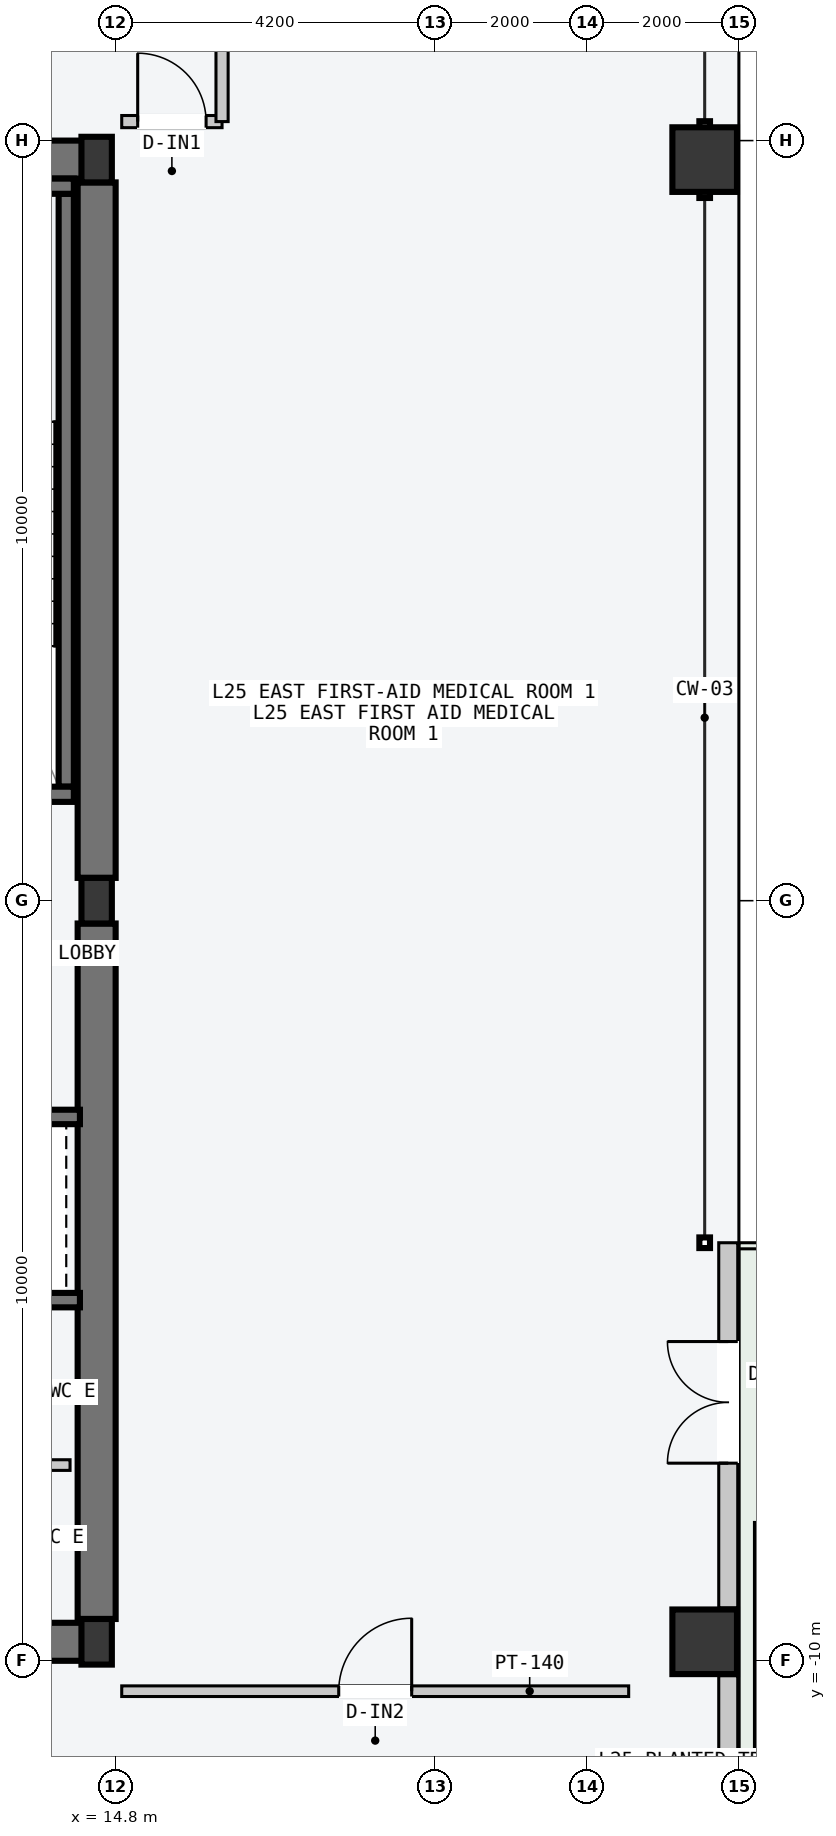
"""IFC4 building model, lengths in metres.
Left out: names, types, materials, properties, quantities, classifications, styles, units other than length and angle.
Written with IfcOpenShell. Run it as: python <this file> out.ifc"""

import sys

from ifc_helpers import new_model, si_unit, direction, frame, frame_2d, origin, origin_2d, place, context, subcontext, project, spatial, rectangle, hollow_rectangle, i_section, extrude, element, fill, save


model = new_model("IFC4")
c1 = context("Model", 3, precision=1e-05, world=origin(), true_north=direction((0.0, 1.0)))
c2 = subcontext(c1, "Body", "Model", "MODEL_VIEW")
j1 = project(units=[si_unit("LENGTHUNIT", "METRE"), si_unit("PLANEANGLEUNIT", "RADIAN")], contexts=[c1])
p1 = place(None, origin())
s1 = spatial("IfcSite", under=j1, at=p1, CompositionType="ELEMENT")
p2 = place(p1, origin())
s2 = spatial("IfcBuilding", under=s1, at=p2, CompositionType="ELEMENT")
p3 = place(p2, frame((0.0, 0.0, 99.0)))
s3 = spatial("IfcBuildingStorey", under=s2, at=p3, CompositionType="ELEMENT", Elevation=99.0)
for number, where, z_axis, x_axis in (
    (1, (8.07, -9.75, -0.2), (0.0, 0.0, 1.0), (1.0, 0.0, 0.0)),
    (2, (8.07, 9.75, -0.2), (0.0, 0.0, 1.0), (1.0, 0.0, 0.0)),
):
    element("IfcWall", number, at=place(p3, frame(where, z_axis=z_axis, x_axis=x_axis)), inside=s3, PredefinedType="SHEAR", context=c2, shape_type="SweptSolid", body=[
        extrude(rectangle(XDim=6.46, YDim=0.5, at=frame_2d((3.23, 0.0))), origin(), (0.0, 0.0, 1.0), 3.6),
    ])
for number, where, z_axis, x_axis in (
    (3, (14.55, -9.45, -0.2), (0.0, 0.0, 1.0), (0.0, 1.0, 0.0)),
    (4, (14.55, 0.3, -0.2), (0.0, 0.0, 1.0), (0.0, 1.0, 0.0)),
):
    element("IfcWall", number, at=place(p3, frame(where, z_axis=z_axis, x_axis=x_axis)), inside=s3, PredefinedType="SHEAR", context=c2, shape_type="SweptSolid", body=[
        extrude(rectangle(XDim=9.15, YDim=0.5, at=frame_2d((4.575, 0.0))), origin(), (0.0, 0.0, 1.0), 3.6),
    ])
p4 = place(p3, frame((14.15, 1.5, -0.2), z_axis=(0.0, 0.0, 1.0), x_axis=(0.0, 1.0, 0.0)))
e5 = element("IfcWall", 5, at=p4, inside=s3, PredefinedType="SOLIDWALL", context=c2, shape_type="SweptSolid", body=[
    extrude(rectangle(XDim=7.8, YDim=0.2, at=frame_2d((3.9, 0.0))), origin(), (0.0, 0.0, 1.0), 3.6),
])
p5 = place(p3, frame((10.15, 1.4, -0.2), z_axis=(0.0, 0.0, 1.0), x_axis=(1.0, 0.0, 0.0)))
e6 = element("IfcWall", 6, at=p5, inside=s3, PredefinedType="SOLIDWALL", context=c2, shape_type="SweptSolid", body=[
    extrude(rectangle(XDim=4.1, YDim=0.2, at=frame_2d((2.05, 0.0))), origin(), (0.0, 0.0, 1.0), 3.6),
])
p6 = place(p5, frame((1.5, 0.0, 0.2)))
e7 = element("IfcOpeningElement", 7, at=p6, cuts=e6, PredefinedType="OPENING", context=c2, shape_type="SweptSolid", body=[
    extrude(rectangle(XDim=1.12, YDim=2.18, at=frame_2d((0.56, 1.09))), frame((0.0, 0.11, 0.0), z_axis=(0.0, -1.0, 0.0), x_axis=(1.0, 0.0, 0.0)), (0.0, 0.0, 1.0), 0.22),
])
p7 = place(p3, frame((10.15, 9.4, -0.2), z_axis=(0.0, 0.0, 1.0), x_axis=(1.0, 0.0, 0.0)))
e8 = element("IfcWall", 8, at=p7, inside=s3, PredefinedType="SOLIDWALL", context=c2, shape_type="SweptSolid", body=[
    extrude(rectangle(XDim=4.1, YDim=0.2, at=frame_2d((2.05, 0.0))), origin(), (0.0, 0.0, 1.0), 3.6),
])
for number, where, z_axis, x_axis in (
    (9, (14.55, -9.75, 0.0), (0.0, 0.0, 1.0), (1.0, 0.0, 0.0)),
    (10, (14.55, 0.0, 0.0), (0.0, 0.0, 1.0), (1.0, 0.0, 0.0)),
    (11, (14.55, 9.75, 0.0), (0.0, 0.0, 1.0), (1.0, 0.0, 0.0)),
):
    element("IfcColumn", number, at=place(p3, frame(where, z_axis=z_axis, x_axis=x_axis)), inside=s3, PredefinedType="COLUMN", context=c2, shape_type="SweptSolid", body=[
        extrude(i_section(OverallWidth=0.4, OverallDepth=0.6, WebThickness=0.022, FlangeThickness=0.036, at=origin_2d()), origin(), (0.0, 0.0, 1.0), 3.6),
    ])
for number, where, z_axis, x_axis in (
    (12, (22.55, -9.75, 0.0), (0.0, 0.0, 1.0), (0.0, 1.0, 0.0)),
    (13, (22.55, 9.75, 0.0), (0.0, 0.0, 1.0), (0.0, 1.0, 0.0)),
):
    element("IfcColumn", number, at=place(p3, frame(where, z_axis=z_axis, x_axis=x_axis)), inside=s3, PredefinedType="COLUMN", context=c2, shape_type="SweptSolid", body=[
        extrude(hollow_rectangle(XDim=0.85, YDim=0.85, WallThickness=0.04, at=origin_2d()), origin(), (0.0, 0.0, 1.0), 3.6),
    ])
p8 = place(p3, frame((22.86, -14.605, 0.0), z_axis=(0.0, 0.0, 1.0), x_axis=(0.0, 1.0, 0.0)))
e14 = element("IfcWall", 14, at=p8, inside=s3, PredefinedType="STANDARD", context=c2, shape_type="SweptSolid", body=[
    extrude(rectangle(XDim=4.41, YDim=0.25, at=frame_2d((2.205, 0.0))), origin(), (0.0, 0.0, 1.0), 3.4),
])
p9 = place(p8, frame((1.405, 0.0, 0.85)))
e15 = element("IfcOpeningElement", 15, at=p9, cuts=e14, PredefinedType="OPENING", context=c2, shape_type="SweptSolid", body=[
    extrude(rectangle(XDim=2.0, YDim=2.1, at=frame_2d((1.0, 1.05))), frame((0.0, 0.135, 0.0), z_axis=(0.0, -1.0, 0.0), x_axis=(1.0, 0.0, 0.0)), (0.0, 0.0, 1.0), 0.27),
])
p10 = place(p3, frame((22.86, -9.305, 0.0), z_axis=(0.0, 0.0, 1.0), x_axis=(0.0, 1.0, 0.0)))
e16 = element("IfcWall", 16, at=p10, inside=s3, PredefinedType="STANDARD", context=c2, shape_type="SweptSolid", body=[
    extrude(rectangle(XDim=4.805, YDim=0.25, at=frame_2d((2.402, 0.0))), origin(), (0.0, 0.0, 1.0), 3.4),
])
p11 = place(p10, frame((1.905, 0.0, 0.0)))
e17 = element("IfcOpeningElement", 17, at=p11, cuts=e16, PredefinedType="OPENING", context=c2, shape_type="SweptSolid", body=[
    extrude(rectangle(XDim=1.6, YDim=2.2, at=frame_2d((0.8, 1.1))), frame((0.0, 0.135, 0.0), z_axis=(0.0, -1.0, 0.0), x_axis=(1.0, 0.0, 0.0)), (0.0, 0.0, 1.0), 0.27),
])
p12 = place(p3, frame((11.65, -2.845, -0.2), z_axis=(0.0, 0.0, 1.0), x_axis=(1.0, 0.0, 0.0)))
e18 = element("IfcWall", 18, at=p12, inside=s3, PredefinedType="SOLIDWALL", context=c2, shape_type="SweptSolid", body=[
    extrude(rectangle(XDim=2.68, YDim=0.19, at=frame_2d((1.34, 0.0))), origin(), (0.0, 0.0, 1.0), 3.6),
])
p13 = place(p12, frame((0.65, 0.0, 0.2)))
e19 = element("IfcOpeningElement", 19, at=p13, cuts=e18, PredefinedType="OPENING", context=c2, shape_type="SweptSolid", body=[
    extrude(rectangle(XDim=1.2, YDim=2.2, at=frame_2d((0.6, 1.1))), frame((0.0, 0.105, 0.0), z_axis=(0.0, -1.0, 0.0), x_axis=(1.0, 0.0, 0.0)), (0.0, 0.0, 1.0), 0.21),
])
p14 = place(p3, frame((11.65, -5.255, -0.2), z_axis=(0.0, 0.0, 1.0), x_axis=(1.0, 0.0, 0.0)))
e20 = element("IfcWall", 20, at=p14, inside=s3, PredefinedType="SOLIDWALL", context=c2, shape_type="SweptSolid", body=[
    extrude(rectangle(XDim=2.68, YDim=0.19, at=frame_2d((1.34, 0.0))), origin(), (0.0, 0.0, 1.0), 3.6),
])
p15 = place(p3, frame((11.7, -7.425, 0.0), z_axis=(0.0, 0.0, 1.0), x_axis=(1.0, 0.0, 0.0)))
e21 = element("IfcWall", 21, at=p15, inside=s3, PredefinedType="PARTITIONING", context=c2, shape_type="SweptSolid", body=[
    extrude(rectangle(XDim=2.5, YDim=0.14, at=frame_2d((1.25, 0.0))), origin(), (0.0, 0.0, 1.0), 3.4),
])
p16 = place(p3, frame((14.88, -10.4, 0.0), z_axis=(0.0, 0.0, 1.0), x_axis=(1.0, 0.0, 0.0)))
e22 = element("IfcWall", 22, at=p16, inside=s3, PredefinedType="PARTITIONING", context=c2, shape_type="SweptSolid", body=[
    extrude(rectangle(XDim=6.67, YDim=0.14, at=frame_2d((3.335, 0.0))), origin(), (0.0, 0.0, 1.0), 3.4),
])
p17 = place(p16, frame((2.855, 0.0, 0.0)))
e23 = element("IfcOpeningElement", 23, at=p17, cuts=e22, PredefinedType="OPENING", context=c2, shape_type="SweptSolid", body=[
    extrude(rectangle(XDim=0.96, YDim=2.18, at=frame_2d((0.48, 1.09))), frame((0.0, 0.08, 0.0), z_axis=(0.0, -1.0, 0.0), x_axis=(1.0, 0.0, 0.0)), (0.0, 0.0, 1.0), 0.16),
])
p18 = place(p3, frame((14.88, 10.25, 0.0), z_axis=(0.0, 0.0, 1.0), x_axis=(1.0, 0.0, 0.0)))
e24 = element("IfcWall", 24, at=p18, inside=s3, PredefinedType="PARTITIONING", context=c2, shape_type="SweptSolid", body=[
    extrude(rectangle(XDim=1.32, YDim=0.16, at=frame_2d((0.66, 0.0))), origin(), (0.0, 0.0, 1.0), 3.4),
])
p19 = place(p18, frame((0.21, 0.0, 0.0)))
e25 = element("IfcOpeningElement", 25, at=p19, cuts=e24, PredefinedType="OPENING", context=c2, shape_type="SweptSolid", body=[
    extrude(rectangle(XDim=0.9, YDim=2.15, at=frame_2d((0.45, 1.075))), frame((0.0, 0.09, 0.0), z_axis=(0.0, -1.0, 0.0), x_axis=(1.0, 0.0, 0.0)), (0.0, 0.0, 1.0), 0.18),
])
p20 = place(p3, frame((16.2, 10.25, 0.0), z_axis=(0.0, 0.0, 1.0), x_axis=(0.0, 1.0, 0.0)))
e26 = element("IfcWall", 26, at=p20, inside=s3, PredefinedType="PARTITIONING", context=c2, shape_type="SweptSolid", body=[
    extrude(rectangle(XDim=1.95, YDim=0.16, at=frame_2d((0.975, 0.0))), origin(), (0.0, 0.0, 1.0), 3.4),
])
p21 = place(p9, origin())
e27 = element("IfcWindow", 27, at=p21, inside=s3, PartitioningType="SINGLE_PANEL", PredefinedType="WINDOW", context=c2, shape_type="SweptSolid", body=[
    extrude(rectangle(XDim=2.0, YDim=2.1, at=frame_2d((1.0, 1.05))), frame((0.0, 0.03, 0.0), z_axis=(0.0, -1.0, 0.0), x_axis=(1.0, 0.0, 0.0)), (0.0, 0.0, 1.0), 0.06),
])
fill(e15, e27)
p22 = place(p11, origin())
e28 = element("IfcDoor", 28, at=p22, inside=s3, OperationType="DOUBLE_DOOR_SINGLE_SWING", PredefinedType="DOOR", context=c2, shape_type="SweptSolid", body=[
    extrude(rectangle(XDim=1.6, YDim=2.2, at=frame_2d((0.8, 1.1))), frame((0.0, 0.025, 0.0), z_axis=(0.0, -1.0, 0.0), x_axis=(1.0, 0.0, 0.0)), (0.0, 0.0, 1.0), 0.05),
])
fill(e17, e28)
p23 = place(p17, origin())
e29 = element("IfcDoor", 29, at=p23, inside=s3, OperationType="SINGLE_SWING_RIGHT", PredefinedType="DOOR", context=c2, shape_type="SweptSolid", body=[
    extrude(rectangle(XDim=0.96, YDim=2.18, at=frame_2d((0.48, 1.09))), frame((0.0, 0.025, 0.0), z_axis=(0.0, -1.0, 0.0), x_axis=(1.0, 0.0, 0.0)), (0.0, 0.0, 1.0), 0.05),
])
fill(e23, e29)
p24 = place(p19, origin())
e30 = element("IfcDoor", 30, at=p24, inside=s3, OperationType="SINGLE_SWING_LEFT", PredefinedType="DOOR", context=c2, shape_type="SweptSolid", body=[
    extrude(rectangle(XDim=0.9, YDim=2.15, at=frame_2d((0.45, 1.075))), frame((0.0, 0.025, 0.0), z_axis=(0.0, -1.0, 0.0), x_axis=(1.0, 0.0, 0.0)), (0.0, 0.0, 1.0), 0.05),
])
fill(e25, e30)
save(model, sys.argv[1])
